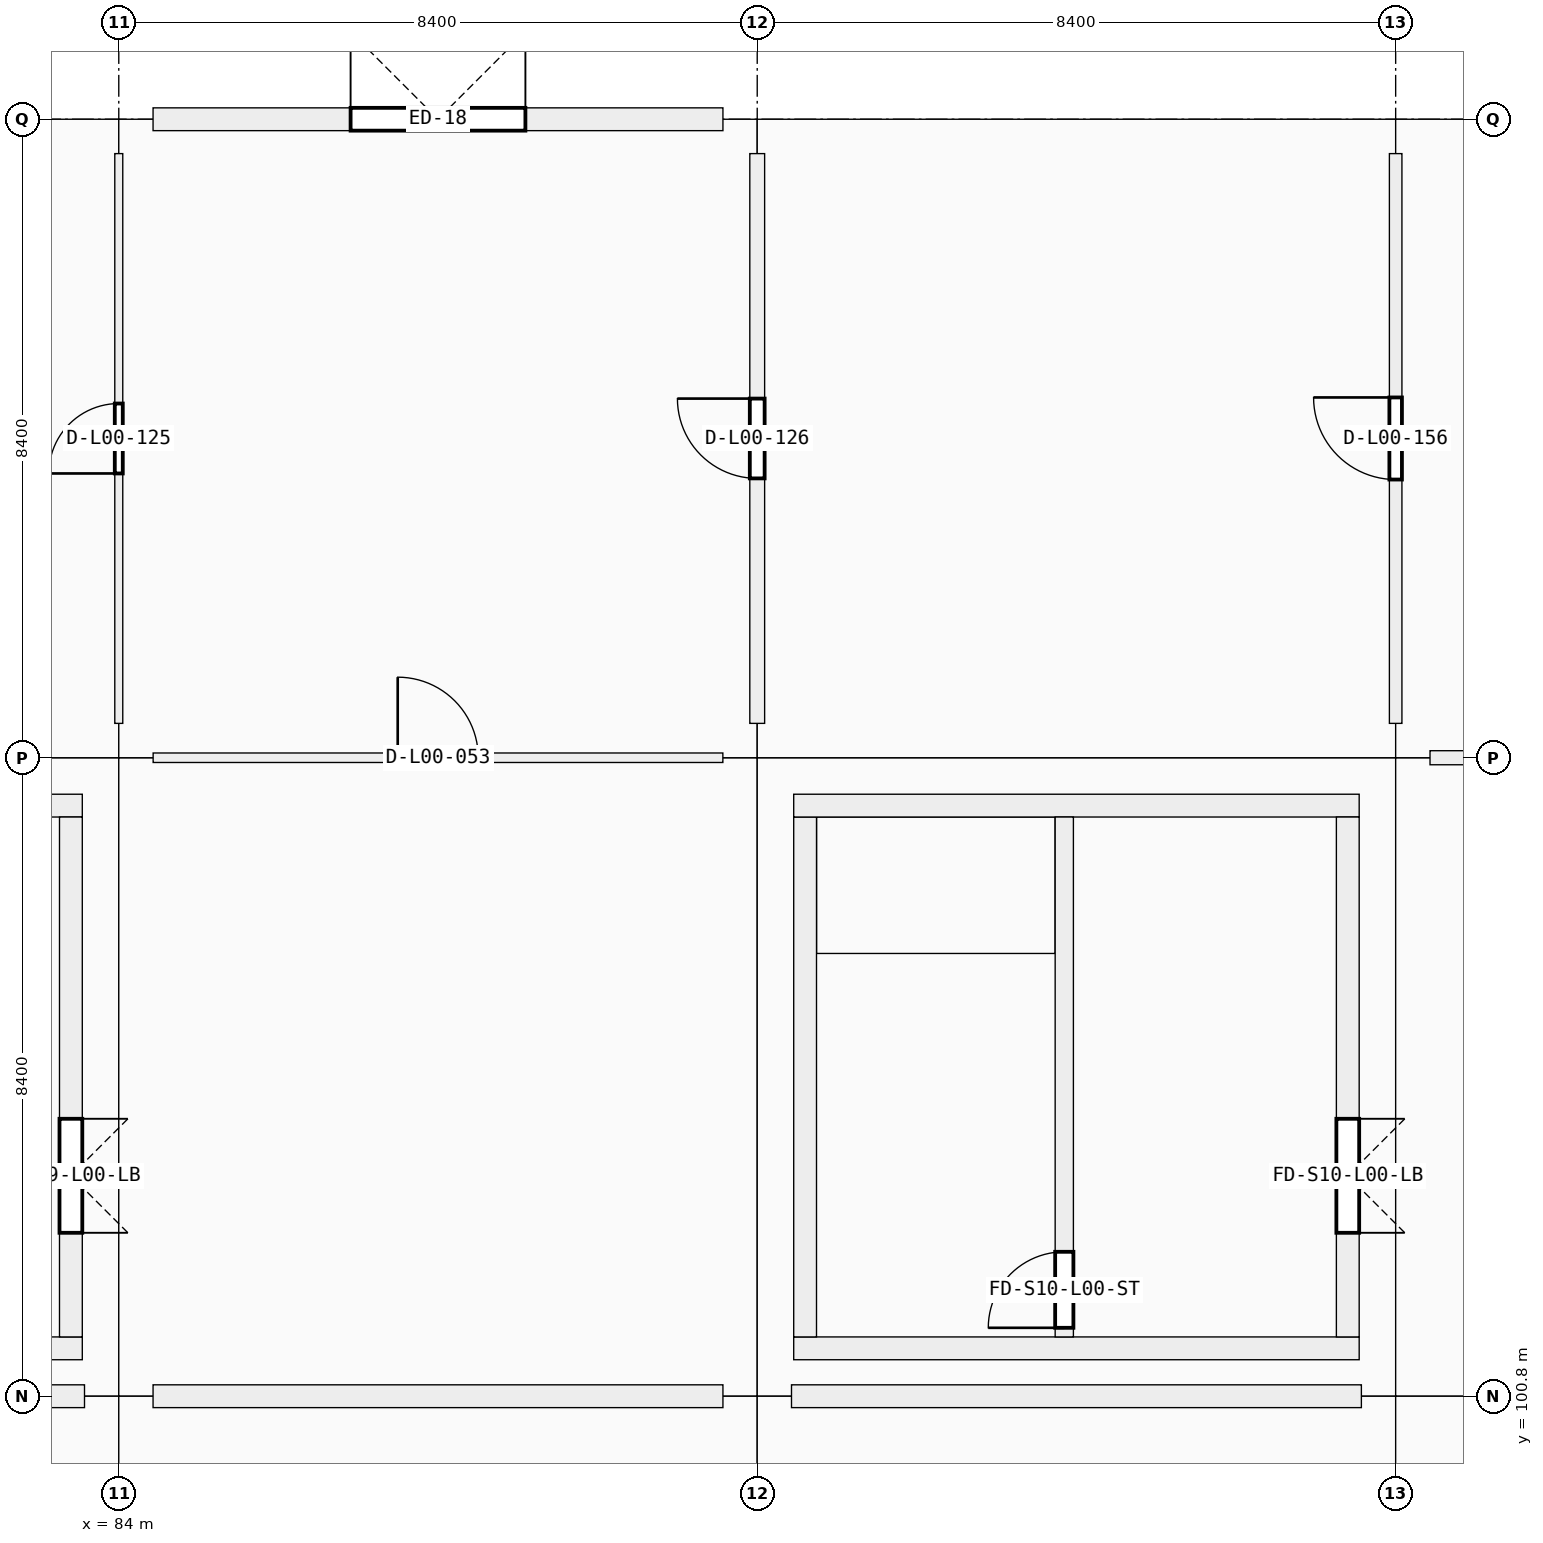
"""IFC4 building model, lengths in metres.
Left out: names, types, materials, properties, quantities, classifications, styles, units other than length and angle.
Written with IfcOpenShell. Run it as: python <this file> out.ifc"""

import sys

from ifc_helpers import new_model, si_unit, direction, frame, frame_2d, origin, origin_2d, place, context, subcontext, project, spatial, rectangle, extrude, element, fill, save


model = new_model("IFC4")
c1 = context("Model", 3, precision=1e-05, world=origin(), true_north=direction((0.0, 1.0)))
c2 = subcontext(c1, "Body", "Model", "MODEL_VIEW")
j1 = project(units=[si_unit("LENGTHUNIT", "METRE"), si_unit("PLANEANGLEUNIT", "RADIAN")], contexts=[c1])
p1 = place(None, origin())
s1 = spatial("IfcSite", under=j1, at=p1, CompositionType="ELEMENT")
p2 = place(p1, origin())
s2 = spatial("IfcBuilding", under=s1, at=p2, CompositionType="ELEMENT")
p3 = place(p2, origin())
s3 = spatial("IfcBuildingStorey", under=s2, at=p3, CompositionType="ELEMENT", Elevation=0.0)
for number, where, z_axis, x_axis in (
    (1, (84.0, 100.8, 0.0), (0.0, 0.0, 1.0), (1.0, 0.0, 0.0)),
    (2, (84.0, 109.2, 0.0), (0.0, 0.0, 1.0), (1.0, 0.0, 0.0)),
    (3, (84.0, 117.6, 0.0), (0.0, 0.0, 1.0), (1.0, 0.0, 0.0)),
    (4, (92.4, 100.8, 0.0), (0.0, 0.0, 1.0), (1.0, 0.0, 0.0)),
    (5, (92.4, 109.2, 0.0), (0.0, 0.0, 1.0), (1.0, 0.0, 0.0)),
    (6, (92.4, 117.6, 0.0), (0.0, 0.0, 1.0), (1.0, 0.0, 0.0)),
    (7, (100.8, 100.8, 0.0), (0.0, 0.0, 1.0), (1.0, 0.0, 0.0)),
    (8, (100.8, 109.2, 0.0), (0.0, 0.0, 1.0), (1.0, 0.0, 0.0)),
    (9, (100.8, 117.6, 0.0), (0.0, 0.0, 1.0), (1.0, 0.0, 0.0)),
):
    element("IfcColumn", number, at=place(p3, frame(where, z_axis=z_axis, x_axis=x_axis)), inside=s3, PredefinedType="COLUMN", context=c2, shape_type="SweptSolid", body=[
        extrude(rectangle(XDim=0.9, YDim=0.9, at=origin_2d()), origin(), (0.0, 0.0, 1.0), 5.76),
    ])
p4 = place(p3, frame((83.549, 100.8, 0.0), z_axis=(0.0, 0.0, 1.0), x_axis=(-1.0, 0.0, 0.0)))
e10 = element("IfcWall", 10, at=p4, inside=s3, PredefinedType="SOLIDWALL", context=c2, shape_type="SweptSolid", body=[
    extrude(rectangle(XDim=7.498, YDim=0.3, at=frame_2d((3.749, 0.0))), origin(), (0.0, 0.0, 1.0), 4.7),
])
p5 = place(p3, frame((91.949, 100.8, 0.0), z_axis=(0.0, 0.0, 1.0), x_axis=(-1.0, 0.0, 0.0)))
e11 = element("IfcWall", 11, at=p5, inside=s3, PredefinedType="SOLIDWALL", context=c2, shape_type="SweptSolid", body=[
    extrude(rectangle(XDim=7.498, YDim=0.3, at=frame_2d((3.749, 0.0))), origin(), (0.0, 0.0, 1.0), 4.7),
])
p6 = place(p5, frame((2.899, 0.0, 0.9)))
e12 = element("IfcOpeningElement", 12, at=p6, cuts=e11, PredefinedType="OPENING", context=c2, shape_type="SweptSolid", body=[
    extrude(rectangle(XDim=1.7, YDim=1.85, at=frame_2d((0.85, 0.925))), frame((0.0, 0.15, 0.0), z_axis=(0.0, -1.0, 0.0), x_axis=(1.0, 0.0, 0.0)), (0.0, 0.0, 1.0), 0.3),
])
p7 = place(p3, frame((84.451, 117.6, 0.0), z_axis=(0.0, 0.0, 1.0), x_axis=(1.0, 0.0, 0.0)))
e13 = element("IfcWall", 13, at=p7, inside=s3, PredefinedType="SOLIDWALL", context=c2, shape_type="SweptSolid", body=[
    extrude(rectangle(XDim=7.498, YDim=0.3, at=frame_2d((3.749, 0.0))), origin(), (0.0, 0.0, 1.0), 4.7),
])
p8 = place(p7, frame((2.599, 0.0, 0.0)))
e14 = element("IfcOpeningElement", 14, at=p8, cuts=e13, PredefinedType="OPENING", context=c2, shape_type="SweptSolid", body=[
    extrude(rectangle(XDim=2.3, YDim=2.3, at=frame_2d((1.15, 1.15))), frame((0.0, 0.15, 0.0), z_axis=(0.0, -1.0, 0.0), x_axis=(1.0, 0.0, 0.0)), (0.0, 0.0, 1.0), 0.3),
])
p9 = place(p3, frame((100.349, 100.8, 0.0), z_axis=(0.0, 0.0, 1.0), x_axis=(-1.0, 0.0, 0.0)))
e15 = element("IfcWall", 15, at=p9, inside=s3, PredefinedType="SOLIDWALL", context=c2, shape_type="SweptSolid", body=[
    extrude(rectangle(XDim=7.498, YDim=0.3, at=frame_2d((3.749, 0.0))), origin(), (0.0, 0.0, 1.0), 4.7),
])
for number, where, z_axis, x_axis in (
    (16, (83.52, 101.43, 0.0), (0.0, 0.0, 1.0), (-1.0, 0.0, 0.0)),
    (17, (76.08, 108.57, 0.0), (0.0, 0.0, 1.0), (1.0, 0.0, 0.0)),
):
    element("IfcWall", number, at=place(p3, frame(where, z_axis=z_axis, x_axis=x_axis)), inside=s3, PredefinedType="SHEAR", context=c2, shape_type="SweptSolid", body=[
        extrude(rectangle(XDim=7.44, YDim=0.3, at=frame_2d((3.72, 0.0))), origin(), (0.0, 0.0, 1.0), 5.76),
    ])
p10 = place(p3, frame((83.37, 108.42, 0.0), z_axis=(0.0, 0.0, 1.0), x_axis=(0.0, -1.0, 0.0)))
e18 = element("IfcWall", 18, at=p10, inside=s3, PredefinedType="SHEAR", context=c2, shape_type="SweptSolid", body=[
    extrude(rectangle(XDim=6.84, YDim=0.3, at=frame_2d((3.42, 0.0))), origin(), (0.0, 0.0, 1.0), 5.76),
])
p11 = place(p10, frame((3.97, 0.0, 0.0)))
e19 = element("IfcOpeningElement", 19, at=p11, cuts=e18, PredefinedType="OPENING", context=c2, shape_type="SweptSolid", body=[
    extrude(rectangle(XDim=1.5, YDim=2.15, at=frame_2d((0.75, 1.075))), frame((0.0, 0.15, 0.0), z_axis=(0.0, -1.0, 0.0), x_axis=(1.0, 0.0, 0.0)), (0.0, 0.0, 1.0), 0.3),
])
p12 = place(p3, frame((100.32, 101.43, 0.0), z_axis=(0.0, 0.0, 1.0), x_axis=(-1.0, 0.0, 0.0)))
e20 = element("IfcWall", 20, at=p12, inside=s3, PredefinedType="SHEAR", context=c2, shape_type="SweptSolid", body=[
    extrude(rectangle(XDim=7.44, YDim=0.3, at=frame_2d((3.72, 0.0))), origin(), (0.0, 0.0, 1.0), 5.76),
])
p13 = place(p3, frame((93.03, 101.58, 0.0), z_axis=(0.0, 0.0, 1.0), x_axis=(0.0, 1.0, 0.0)))
e21 = element("IfcWall", 21, at=p13, inside=s3, PredefinedType="SHEAR", context=c2, shape_type="SweptSolid", body=[
    extrude(rectangle(XDim=6.84, YDim=0.3, at=frame_2d((3.42, 0.0))), origin(), (0.0, 0.0, 1.0), 5.76),
])
p14 = place(p3, frame((92.88, 108.57, 0.0), z_axis=(0.0, 0.0, 1.0), x_axis=(1.0, 0.0, 0.0)))
e22 = element("IfcWall", 22, at=p14, inside=s3, PredefinedType="SHEAR", context=c2, shape_type="SweptSolid", body=[
    extrude(rectangle(XDim=7.44, YDim=0.3, at=frame_2d((3.72, 0.0))), origin(), (0.0, 0.0, 1.0), 5.76),
])
p15 = place(p3, frame((100.17, 108.42, 0.0), z_axis=(0.0, 0.0, 1.0), x_axis=(0.0, -1.0, 0.0)))
e23 = element("IfcWall", 23, at=p15, inside=s3, PredefinedType="SHEAR", context=c2, shape_type="SweptSolid", body=[
    extrude(rectangle(XDim=6.84, YDim=0.3, at=frame_2d((3.42, 0.0))), origin(), (0.0, 0.0, 1.0), 5.76),
])
p16 = place(p15, frame((3.97, 0.0, 0.0)))
e24 = element("IfcOpeningElement", 24, at=p16, cuts=e23, PredefinedType="OPENING", context=c2, shape_type="SweptSolid", body=[
    extrude(rectangle(XDim=1.5, YDim=2.15, at=frame_2d((0.75, 1.075))), frame((0.0, 0.15, 0.0), z_axis=(0.0, -1.0, 0.0), x_axis=(1.0, 0.0, 0.0)), (0.0, 0.0, 1.0), 0.3),
])
p17 = place(p3, frame((96.44, 101.58, 0.0), z_axis=(0.0, 0.0, 1.0), x_axis=(0.0, 1.0, 0.0)))
e25 = element("IfcWall", 25, at=p17, inside=s3, PredefinedType="SHEAR", context=c2, shape_type="SweptSolid", body=[
    extrude(rectangle(XDim=6.84, YDim=0.24, at=frame_2d((3.42, 0.0))), origin(), (0.0, 0.0, 1.0), 5.76),
])
p18 = place(p17, frame((0.12, 0.0, 0.0)))
e26 = element("IfcOpeningElement", 26, at=p18, cuts=e25, PredefinedType="OPENING", context=c2, shape_type="SweptSolid", body=[
    extrude(rectangle(XDim=1.0, YDim=2.15, at=frame_2d((0.5, 1.075))), frame((0.0, 0.12, 0.0), z_axis=(0.0, -1.0, 0.0), x_axis=(1.0, 0.0, 0.0)), (0.0, 0.0, 1.0), 0.24),
])
p19 = place(p3, frame((84.452, 109.2, 0.0), z_axis=(0.0, 0.0, 1.0), x_axis=(1.0, 0.0, 0.0)))
e27 = element("IfcWall", 27, at=p19, inside=s3, PredefinedType="PARTITIONING", context=c2, shape_type="SweptSolid", body=[
    extrude(rectangle(XDim=7.496, YDim=0.125, at=frame_2d((3.748, 0.0))), origin(), (0.0, 0.0, 1.0), 3.66),
])
p20 = place(p19, frame((3.218, 0.0, 0.0)))
e28 = element("IfcOpeningElement", 28, at=p20, cuts=e27, PredefinedType="OPENING", context=c2, shape_type="SweptSolid", body=[
    extrude(rectangle(XDim=1.06, YDim=2.25, at=frame_2d((0.53, 1.125))), frame((0.0, 0.062, 0.0), z_axis=(0.0, -1.0, 0.0), x_axis=(1.0, 0.0, 0.0)), (0.0, 0.0, 1.0), 0.125),
])
p21 = place(p3, frame((101.252, 109.2, 0.0), z_axis=(0.0, 0.0, 1.0), x_axis=(1.0, 0.0, 0.0)))
e29 = element("IfcWall", 29, at=p21, inside=s3, PredefinedType="PARTITIONING", context=c2, shape_type="SweptSolid", body=[
    extrude(rectangle(XDim=7.496, YDim=0.185, at=frame_2d((3.748, 0.0))), origin(), (0.0, 0.0, 1.0), 3.66),
])
p22 = place(p21, frame((3.278, 0.0, 0.0)))
e30 = element("IfcOpeningElement", 30, at=p22, cuts=e29, PredefinedType="OPENING", context=c2, shape_type="SweptSolid", body=[
    extrude(rectangle(XDim=0.94, YDim=2.15, at=frame_2d((0.47, 1.075))), frame((0.0, 0.093, 0.0), z_axis=(0.0, -1.0, 0.0), x_axis=(1.0, 0.0, 0.0)), (0.0, 0.0, 1.0), 0.185),
])
p23 = place(p3, frame((84.0, 109.652, 0.0), z_axis=(0.0, 0.0, 1.0), x_axis=(0.0, 1.0, 0.0)))
e31 = element("IfcWall", 31, at=p23, inside=s3, PredefinedType="PARTITIONING", context=c2, shape_type="SweptSolid", body=[
    extrude(rectangle(XDim=7.496, YDim=0.105, at=frame_2d((3.748, 0.0))), origin(), (0.0, 0.0, 1.0), 3.66),
])
p24 = place(p23, frame((3.288, 0.0, 0.0)))
e32 = element("IfcOpeningElement", 32, at=p24, cuts=e31, PredefinedType="OPENING", context=c2, shape_type="SweptSolid", body=[
    extrude(rectangle(XDim=0.92, YDim=2.15, at=frame_2d((0.46, 1.075))), frame((0.0, 0.052, 0.0), z_axis=(0.0, -1.0, 0.0), x_axis=(1.0, 0.0, 0.0)), (0.0, 0.0, 1.0), 0.105),
])
p25 = place(p3, frame((92.4, 109.652, 0.0), z_axis=(0.0, 0.0, 1.0), x_axis=(0.0, 1.0, 0.0)))
e33 = element("IfcWall", 33, at=p25, inside=s3, PredefinedType="PARTITIONING", context=c2, shape_type="SweptSolid", body=[
    extrude(rectangle(XDim=7.496, YDim=0.195, at=frame_2d((3.748, 0.0))), origin(), (0.0, 0.0, 1.0), 3.66),
])
p26 = place(p25, frame((3.223, 0.0, 0.0)))
e34 = element("IfcOpeningElement", 34, at=p26, cuts=e33, PredefinedType="OPENING", context=c2, shape_type="SweptSolid", body=[
    extrude(rectangle(XDim=1.05, YDim=2.12, at=frame_2d((0.525, 1.06))), frame((0.0, 0.098, 0.0), z_axis=(0.0, -1.0, 0.0), x_axis=(1.0, 0.0, 0.0)), (0.0, 0.0, 1.0), 0.195),
])
p27 = place(p3, frame((100.8, 109.652, 0.0), z_axis=(0.0, 0.0, 1.0), x_axis=(0.0, 1.0, 0.0)))
e35 = element("IfcWall", 35, at=p27, inside=s3, PredefinedType="PARTITIONING", context=c2, shape_type="SweptSolid", body=[
    extrude(rectangle(XDim=7.496, YDim=0.165, at=frame_2d((3.748, 0.0))), origin(), (0.0, 0.0, 1.0), 3.66),
])
p28 = place(p27, frame((3.208, 0.0, 0.0)))
e36 = element("IfcOpeningElement", 36, at=p28, cuts=e35, PredefinedType="OPENING", context=c2, shape_type="SweptSolid", body=[
    extrude(rectangle(XDim=1.08, YDim=2.25, at=frame_2d((0.54, 1.125))), frame((0.0, 0.083, 0.0), z_axis=(0.0, -1.0, 0.0), x_axis=(1.0, 0.0, 0.0)), (0.0, 0.0, 1.0), 0.165),
])
p29 = place(p6, origin())
e37 = element("IfcWindow", 37, at=p29, inside=s3, PartitioningType="SINGLE_PANEL", PredefinedType="WINDOW", context=c2, shape_type="SweptSolid", body=[
    extrude(rectangle(XDim=1.7, YDim=1.85, at=frame_2d((0.85, 0.925))), frame((0.0, 0.03, 0.0), z_axis=(0.0, -1.0, 0.0), x_axis=(1.0, 0.0, 0.0)), (0.0, 0.0, 1.0), 0.06),
])
fill(e12, e37)
p30 = place(p8, origin())
e38 = element("IfcDoor", 38, at=p30, inside=s3, OperationType="DOUBLE_DOOR_SINGLE_SWING", PredefinedType="DOOR", context=c2, shape_type="SweptSolid", body=[
    extrude(rectangle(XDim=2.3, YDim=2.3, at=frame_2d((1.15, 1.15))), frame((0.0, 0.025, 0.0), z_axis=(0.0, -1.0, 0.0), x_axis=(1.0, 0.0, 0.0)), (0.0, 0.0, 1.0), 0.05),
])
fill(e14, e38)
p31 = place(p11, origin())
e39 = element("IfcDoor", 39, at=p31, inside=s3, OperationType="DOUBLE_DOOR_SINGLE_SWING", PredefinedType="DOOR", context=c2, shape_type="SweptSolid", body=[
    extrude(rectangle(XDim=1.5, YDim=2.15, at=frame_2d((0.75, 1.075))), frame((0.0, 0.025, 0.0), z_axis=(0.0, -1.0, 0.0), x_axis=(1.0, 0.0, 0.0)), (0.0, 0.0, 1.0), 0.05),
])
fill(e19, e39)
p32 = place(p18, origin())
e40 = element("IfcDoor", 40, at=p32, inside=s3, OperationType="SINGLE_SWING_LEFT", PredefinedType="DOOR", context=c2, shape_type="SweptSolid", body=[
    extrude(rectangle(XDim=1.0, YDim=2.15, at=frame_2d((0.5, 1.075))), frame((0.0, 0.025, 0.0), z_axis=(0.0, -1.0, 0.0), x_axis=(1.0, 0.0, 0.0)), (0.0, 0.0, 1.0), 0.05),
])
fill(e26, e40)
p33 = place(p16, origin())
e41 = element("IfcDoor", 41, at=p33, inside=s3, OperationType="DOUBLE_DOOR_SINGLE_SWING", PredefinedType="DOOR", context=c2, shape_type="SweptSolid", body=[
    extrude(rectangle(XDim=1.5, YDim=2.15, at=frame_2d((0.75, 1.075))), frame((0.0, 0.025, 0.0), z_axis=(0.0, -1.0, 0.0), x_axis=(1.0, 0.0, 0.0)), (0.0, 0.0, 1.0), 0.05),
])
fill(e24, e41)
p34 = place(p20, origin())
e42 = element("IfcDoor", 42, at=p34, inside=s3, OperationType="SINGLE_SWING_LEFT", PredefinedType="DOOR", context=c2, shape_type="SweptSolid", body=[
    extrude(rectangle(XDim=1.06, YDim=2.25, at=frame_2d((0.53, 1.125))), frame((0.0, 0.025, 0.0), z_axis=(0.0, -1.0, 0.0), x_axis=(1.0, 0.0, 0.0)), (0.0, 0.0, 1.0), 0.05),
])
fill(e28, e42)
p35 = place(p24, origin())
e43 = element("IfcDoor", 43, at=p35, inside=s3, OperationType="SINGLE_SWING_LEFT", PredefinedType="DOOR", context=c2, shape_type="SweptSolid", body=[
    extrude(rectangle(XDim=0.92, YDim=2.15, at=frame_2d((0.46, 1.075))), frame((0.0, 0.025, 0.0), z_axis=(0.0, -1.0, 0.0), x_axis=(1.0, 0.0, 0.0)), (0.0, 0.0, 1.0), 0.05),
])
fill(e32, e43)
p36 = place(p26, origin())
e44 = element("IfcDoor", 44, at=p36, inside=s3, OperationType="SINGLE_SWING_RIGHT", PredefinedType="DOOR", context=c2, shape_type="SweptSolid", body=[
    extrude(rectangle(XDim=1.05, YDim=2.12, at=frame_2d((0.525, 1.06))), frame((0.0, 0.025, 0.0), z_axis=(0.0, -1.0, 0.0), x_axis=(1.0, 0.0, 0.0)), (0.0, 0.0, 1.0), 0.05),
])
fill(e34, e44)
p37 = place(p28, origin())
e45 = element("IfcDoor", 45, at=p37, inside=s3, OperationType="SINGLE_SWING_RIGHT", PredefinedType="DOOR", context=c2, shape_type="SweptSolid", body=[
    extrude(rectangle(XDim=1.08, YDim=2.25, at=frame_2d((0.54, 1.125))), frame((0.0, 0.025, 0.0), z_axis=(0.0, -1.0, 0.0), x_axis=(1.0, 0.0, 0.0)), (0.0, 0.0, 1.0), 0.05),
])
fill(e36, e45)
save(model, sys.argv[1])
